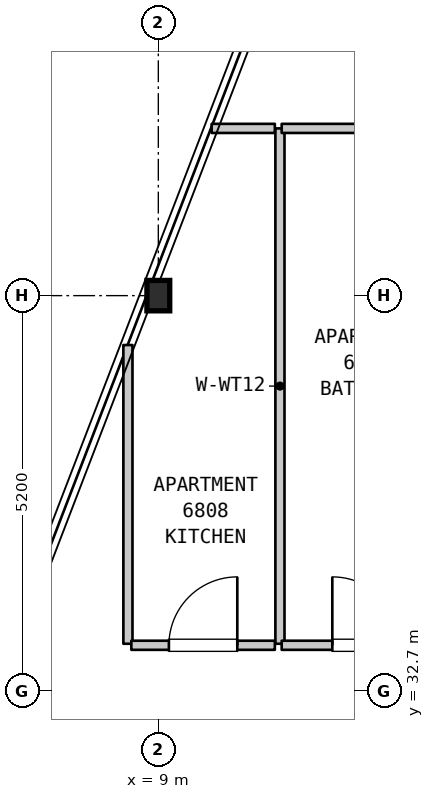
"""IFC4 building model, lengths in metres.
Left out: names, types, materials, properties, quantities, classifications, styles, units other than length and angle.
Written with IfcOpenShell. Run it as: python <this file> out.ifc"""

import sys

from ifc_helpers import new_model, si_unit, direction, frame, frame_2d, origin, origin_2d, place, context, subcontext, project, spatial, rectangle, i_section, extrude, element, fill, save


model = new_model("IFC4")
c1 = context("Model", 3, precision=1e-05, world=origin(), true_north=direction((0.0, 1.0)))
c2 = subcontext(c1, "Body", "Model", "MODEL_VIEW")
j1 = project(units=[si_unit("LENGTHUNIT", "METRE"), si_unit("PLANEANGLEUNIT", "RADIAN")], contexts=[c1])
p1 = place(None, origin())
s1 = spatial("IfcSite", under=j1, at=p1, CompositionType="ELEMENT")
p2 = place(p1, origin())
s2 = spatial("IfcBuilding", under=s1, at=p2, CompositionType="ELEMENT")
p3 = place(p2, frame((0.0, 0.0, 273.2)))
s3 = spatial("IfcBuildingStorey", under=s2, at=p3, CompositionType="ELEMENT", Elevation=273.2)
p4 = place(p3, frame((9.0, 37.9, 0.0), z_axis=(0.0, 0.0, 1.0), x_axis=(1.0, 0.0, 0.0)))
e1 = element("IfcColumn", 1, at=p4, inside=s3, PredefinedType="COLUMN", context=c2, shape_type="SweptSolid", body=[
    extrude(i_section(OverallWidth=0.3, OverallDepth=0.4, WebThickness=0.013, FlangeThickness=0.024, FilletRadius=0.027, at=origin_2d()), origin(), (0.0, 0.0, 1.0), 3.7),
])
p5 = place(p3, frame((8.6, 33.32, 0.0), z_axis=(0.0, 0.0, 1.0), x_axis=(0.0, 1.0, 0.0)))
e2 = element("IfcWall", 2, at=p5, inside=s3, PredefinedType="PARTITIONING", context=c2, shape_type="SweptSolid", body=[
    extrude(rectangle(XDim=3.93, YDim=0.12, at=frame_2d((1.965, 0.0))), origin(), (0.0, 0.0, 1.0), 3.39),
])
p6 = place(p3, frame((10.6, 33.32, 0.0), z_axis=(0.0, 0.0, 1.0), x_axis=(0.0, 1.0, 0.0)))
e3 = element("IfcWall", 3, at=p6, inside=s3, PredefinedType="PARTITIONING", context=c2, shape_type="SweptSolid", body=[
    extrude(rectangle(XDim=6.78, YDim=0.12, at=frame_2d((3.39, 0.0))), origin(), (0.0, 0.0, 1.0), 3.39),
])
p7 = place(p3, frame((8.645, 33.3, 0.0), z_axis=(0.0, 0.0, 1.0), x_axis=(1.0, 0.0, 0.0)))
e4 = element("IfcWall", 4, at=p7, inside=s3, PredefinedType="PARTITIONING", context=c2, shape_type="SweptSolid", body=[
    extrude(rectangle(XDim=1.888, YDim=0.12, at=frame_2d((0.944, 0.0))), origin(), (0.0, 0.0, 1.0), 3.39),
])
p8 = place(p7, frame((0.494, 0.0, 0.0)))
e5 = element("IfcOpeningElement", 5, at=p8, cuts=e4, PredefinedType="OPENING", context=c2, shape_type="SweptSolid", body=[
    extrude(rectangle(XDim=0.9, YDim=2.15, at=frame_2d((0.45, 1.075))), frame((0.0, 0.07, 0.0), z_axis=(0.0, -1.0, 0.0), x_axis=(1.0, 0.0, 0.0)), (0.0, 0.0, 1.0), 0.14),
])
p9 = place(p3, frame((10.623, 33.3, 0.0), z_axis=(0.0, 0.0, 1.0), x_axis=(1.0, 0.0, 0.0)))
e6 = element("IfcWall", 6, at=p9, inside=s3, PredefinedType="PARTITIONING", context=c2, shape_type="SweptSolid", body=[
    extrude(rectangle(XDim=2.202, YDim=0.12, at=frame_2d((1.101, 0.0))), origin(), (0.0, 0.0, 1.0), 3.39),
])
p10 = place(p9, frame((0.666, 0.0, 0.0)))
e7 = element("IfcOpeningElement", 7, at=p10, cuts=e6, PredefinedType="OPENING", context=c2, shape_type="SweptSolid", body=[
    extrude(rectangle(XDim=0.9, YDim=2.1, at=frame_2d((0.45, 1.05))), frame((0.0, 0.07, 0.0), z_axis=(0.0, -1.0, 0.0), x_axis=(1.0, 0.0, 0.0)), (0.0, 0.0, 1.0), 0.14),
])
p11 = place(p3, frame((9.702, 40.1, 0.0), z_axis=(0.0, 0.0, 1.0), x_axis=(1.0, 0.0, 0.0)))
e8 = element("IfcWall", 8, at=p11, inside=s3, PredefinedType="PARTITIONING", context=c2, shape_type="SweptSolid", body=[
    extrude(rectangle(XDim=0.831, YDim=0.12, at=frame_2d((0.416, 0.0))), origin(), (0.0, 0.0, 1.0), 3.39),
])
p12 = place(p3, frame((10.623, 40.1, 0.0), z_axis=(0.0, 0.0, 1.0), x_axis=(1.0, 0.0, 0.0)))
e9 = element("IfcWall", 9, at=p12, inside=s3, PredefinedType="PARTITIONING", context=c2, shape_type="SweptSolid", body=[
    extrude(rectangle(XDim=2.202, YDim=0.12, at=frame_2d((1.101, 0.0))), origin(), (0.0, 0.0, 1.0), 3.39),
])
p13 = place(p8, origin())
e10 = element("IfcDoor", 10, at=p13, inside=s3, OperationType="SINGLE_SWING_RIGHT", PredefinedType="DOOR", context=c2, shape_type="SweptSolid", body=[
    extrude(rectangle(XDim=0.9, YDim=2.15, at=frame_2d((0.45, 1.075))), frame((0.0, 0.025, 0.0), z_axis=(0.0, -1.0, 0.0), x_axis=(1.0, 0.0, 0.0)), (0.0, 0.0, 1.0), 0.05),
])
fill(e5, e10)
p14 = place(p10, origin())
e11 = element("IfcDoor", 11, at=p14, inside=s3, OperationType="SINGLE_SWING_LEFT", PredefinedType="DOOR", context=c2, shape_type="SweptSolid", body=[
    extrude(rectangle(XDim=0.9, YDim=2.1, at=frame_2d((0.45, 1.05))), frame((0.0, 0.025, 0.0), z_axis=(0.0, -1.0, 0.0), x_axis=(1.0, 0.0, 0.0)), (0.0, 0.0, 1.0), 0.05),
])
fill(e7, e11)
save(model, sys.argv[1])
